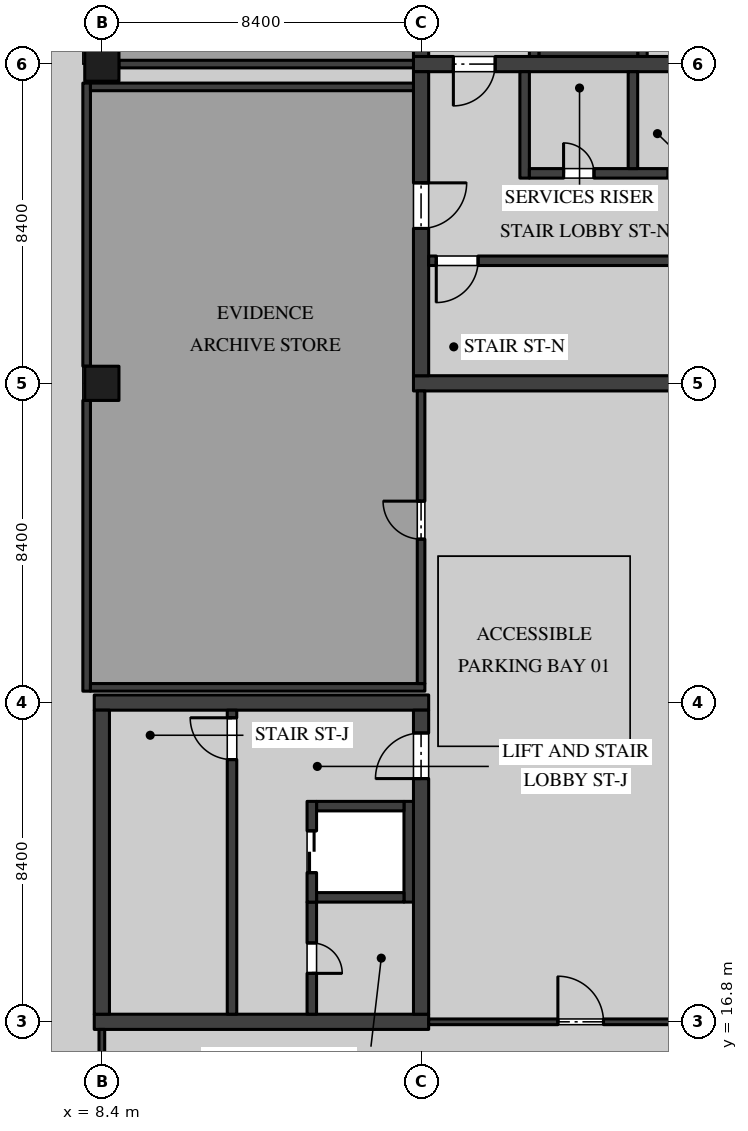
"""IFC4 building model, lengths in metres.
Left out: names, types, materials, properties, quantities, classifications, styles, units other than length and angle.
Written with IfcOpenShell. Run it as: python <this file> out.ifc"""

import sys

from ifc_helpers import new_model, si_unit, direction, frame, frame_2d, origin, origin_2d, place, context, subcontext, project, spatial, rectangle, extrude, element, fill, save


model = new_model("IFC4")
c1 = context("Model", 3, precision=1e-05, world=origin(), true_north=direction((0.0, 1.0)))
c2 = subcontext(c1, "Body", "Model", "MODEL_VIEW")
j1 = project(units=[si_unit("LENGTHUNIT", "METRE"), si_unit("PLANEANGLEUNIT", "RADIAN")], contexts=[c1])
p1 = place(None, origin())
s1 = spatial("IfcSite", under=j1, at=p1, CompositionType="ELEMENT")
p2 = place(p1, origin())
s2 = spatial("IfcBuilding", under=s1, at=p2, CompositionType="ELEMENT")
p3 = place(p2, frame((0.0, 0.0, -4.5)))
s3 = spatial("IfcBuildingStorey", under=s2, at=p3, CompositionType="ELEMENT", Elevation=-4.5)
for number, where, z_axis, x_axis in (
    (1, (8.4, 33.6, 0.0), (0.0, 0.0, 1.0), (1.0, 0.0, 0.0)),
    (2, (8.4, 42.0, 0.0), (0.0, 0.0, 1.0), (1.0, 0.0, 0.0)),
):
    element("IfcColumn", number, at=place(p3, frame(where, z_axis=z_axis, x_axis=x_axis)), inside=s3, PredefinedType="COLUMN", context=c2, shape_type="SweptSolid", body=[
        extrude(rectangle(XDim=0.9, YDim=0.9, at=origin_2d()), origin(), (0.0, 0.0, 1.0), 4.05),
    ])
for number, where, z_axis, x_axis in (
    (3, (8.2, 16.8, 0.0), (0.0, 0.0, 1.0), (1.0, 0.0, 0.0)),
    (4, (8.2, 25.2, 0.0), (0.0, 0.0, 1.0), (1.0, 0.0, 0.0)),
):
    element("IfcWall", number, at=place(p3, frame(where, z_axis=z_axis, x_axis=x_axis)), inside=s3, PredefinedType="SHEAR", context=c2, shape_type="SweptSolid", body=[
        extrude(rectangle(XDim=8.8, YDim=0.4, at=frame_2d((4.4, 0.0))), origin(), (0.0, 0.0, 1.0), 4.05),
    ])
p4 = place(p3, frame((8.4, 17.0, 0.0), z_axis=(0.0, 0.0, 1.0), x_axis=(0.0, 1.0, 0.0)))
e5 = element("IfcWall", 5, at=p4, inside=s3, PredefinedType="SHEAR", context=c2, shape_type="SweptSolid", body=[
    extrude(rectangle(XDim=8.0, YDim=0.4, at=frame_2d((4.0, 0.0))), origin(), (0.0, 0.0, 1.0), 4.05),
])
p5 = place(p3, frame((16.8, 17.0, 0.0), z_axis=(0.0, 0.0, 1.0), x_axis=(0.0, 1.0, 0.0)))
e6 = element("IfcWall", 6, at=p5, inside=s3, PredefinedType="SHEAR", context=c2, shape_type="SweptSolid", body=[
    extrude(rectangle(XDim=8.0, YDim=0.4, at=frame_2d((4.0, 0.0))), origin(), (0.0, 0.0, 1.0), 4.05),
])
p6 = place(p5, frame((6.2, 0.0, 0.0)))
e7 = element("IfcOpeningElement", 7, at=p6, cuts=e6, PredefinedType="OPENING", context=c2, shape_type="SweptSolid", body=[
    extrude(rectangle(XDim=1.2, YDim=2.1, at=frame_2d((0.6, 1.05))), frame((0.0, 0.21, 0.0), z_axis=(0.0, -1.0, 0.0), x_axis=(1.0, 0.0, 0.0)), (0.0, 0.0, 1.0), 0.42),
])
p7 = place(p3, frame((11.825, 25.0, 0.0), z_axis=(0.0, 0.0, 1.0), x_axis=(0.0, -1.0, 0.0)))
e8 = element("IfcWall", 8, at=p7, inside=s3, PredefinedType="SOLIDWALL", context=c2, shape_type="SweptSolid", body=[
    extrude(rectangle(XDim=8.0, YDim=0.25, at=frame_2d((4.0, 0.0))), origin(), (0.0, 0.0, 1.0), 4.05),
])
p8 = place(p7, frame((0.2, 0.0, 0.0)))
e9 = element("IfcOpeningElement", 9, at=p8, cuts=e8, PredefinedType="OPENING", context=c2, shape_type="SweptSolid", body=[
    extrude(rectangle(XDim=1.1, YDim=2.1, at=frame_2d((0.55, 1.05))), frame((0.0, 0.135, 0.0), z_axis=(0.0, -1.0, 0.0), x_axis=(1.0, 0.0, 0.0)), (0.0, 0.0, 1.0), 0.27),
])
p9 = place(p3, frame((13.925, 19.95, 0.0), z_axis=(0.0, 0.0, 1.0), x_axis=(0.0, -1.0, 0.0)))
e10 = element("IfcWall", 10, at=p9, inside=s3, PredefinedType="SOLIDWALL", context=c2, shape_type="SweptSolid", body=[
    extrude(rectangle(XDim=2.95, YDim=0.25, at=frame_2d((1.475, 0.0))), origin(), (0.0, 0.0, 1.0), 4.05),
])
p10 = place(p9, frame((1.075, 0.0, 0.0)))
e11 = element("IfcOpeningElement", 11, at=p10, cuts=e10, PredefinedType="OPENING", context=c2, shape_type="SweptSolid", body=[
    extrude(rectangle(XDim=0.8, YDim=2.1, at=frame_2d((0.4, 1.05))), frame((0.0, 0.135, 0.0), z_axis=(0.0, -1.0, 0.0), x_axis=(1.0, 0.0, 0.0)), (0.0, 0.0, 1.0), 0.27),
])
p11 = place(p3, frame((16.6, 42.0, 0.0), z_axis=(0.0, 0.0, 1.0), x_axis=(1.0, 0.0, 0.0)))
e12 = element("IfcWall", 12, at=p11, inside=s3, PredefinedType="SHEAR", context=c2, shape_type="SweptSolid", body=[
    extrude(rectangle(XDim=8.8, YDim=0.4, at=frame_2d((4.4, 0.0))), origin(), (0.0, 0.0, 1.0), 4.05),
])
p12 = place(p11, frame((1.05, 0.0, 0.0)))
e13 = element("IfcOpeningElement", 13, at=p12, cuts=e12, PredefinedType="OPENING", context=c2, shape_type="SweptSolid", body=[
    extrude(rectangle(XDim=1.1, YDim=2.1, at=frame_2d((0.55, 1.05))), frame((0.0, 0.21, 0.0), z_axis=(0.0, -1.0, 0.0), x_axis=(1.0, 0.0, 0.0)), (0.0, 0.0, 1.0), 0.42),
])
p13 = place(p3, frame((16.8, 42.2, 0.0), z_axis=(0.0, 0.0, 1.0), x_axis=(0.0, 1.0, 0.0)))
e14 = element("IfcWall", 14, at=p13, inside=s3, PredefinedType="SHEAR", context=c2, shape_type="SweptSolid", body=[
    extrude(rectangle(XDim=8.0, YDim=0.4, at=frame_2d((4.0, 0.0))), origin(), (0.0, 0.0, 1.0), 4.05),
])
p14 = place(p13, frame((3.55, 0.0, 0.0)))
e15 = element("IfcOpeningElement", 15, at=p14, cuts=e14, PredefinedType="OPENING", context=c2, shape_type="SweptSolid", body=[
    extrude(rectangle(XDim=1.2, YDim=2.1, at=frame_2d((0.6, 1.05))), frame((0.0, 0.21, 0.0), z_axis=(0.0, -1.0, 0.0), x_axis=(1.0, 0.0, 0.0)), (0.0, 0.0, 1.0), 0.42),
])
p15 = place(p13, frame((0.8, 0.0, 0.0)))
e16 = element("IfcOpeningElement", 16, at=p15, cuts=e14, PredefinedType="OPENING", context=c2, shape_type="SweptSolid", body=[
    extrude(rectangle(XDim=1.2, YDim=2.1, at=frame_2d((0.6, 1.05))), frame((0.0, 0.21, 0.0), z_axis=(0.0, -1.0, 0.0), x_axis=(1.0, 0.0, 0.0)), (0.0, 0.0, 1.0), 0.42),
])
p16 = place(p3, frame((16.6, 33.6, 0.0), z_axis=(0.0, 0.0, 1.0), x_axis=(1.0, 0.0, 0.0)))
e17 = element("IfcWall", 17, at=p16, inside=s3, PredefinedType="SHEAR", context=c2, shape_type="SweptSolid", body=[
    extrude(rectangle(XDim=8.8, YDim=0.4, at=frame_2d((4.4, 0.0))), origin(), (0.0, 0.0, 1.0), 4.05),
])
p17 = place(p3, frame((16.8, 33.8, 0.0), z_axis=(0.0, 0.0, 1.0), x_axis=(0.0, 1.0, 0.0)))
e18 = element("IfcWall", 18, at=p17, inside=s3, PredefinedType="SHEAR", context=c2, shape_type="SweptSolid", body=[
    extrude(rectangle(XDim=8.0, YDim=0.4, at=frame_2d((4.0, 0.0))), origin(), (0.0, 0.0, 1.0), 4.05),
])
p18 = place(p17, frame((3.875, 0.0, 0.0)))
e19 = element("IfcOpeningElement", 19, at=p18, cuts=e18, PredefinedType="OPENING", context=c2, shape_type="SweptSolid", body=[
    extrude(rectangle(XDim=1.2, YDim=2.1, at=frame_2d((0.6, 1.05))), frame((0.0, 0.21, 0.0), z_axis=(0.0, -1.0, 0.0), x_axis=(1.0, 0.0, 0.0)), (0.0, 0.0, 1.0), 0.42),
])
p19 = place(p3, frame((17.0, 36.825, 0.0), z_axis=(0.0, 0.0, 1.0), x_axis=(1.0, 0.0, 0.0)))
e20 = element("IfcWall", 20, at=p19, inside=s3, PredefinedType="SOLIDWALL", context=c2, shape_type="SweptSolid", body=[
    extrude(rectangle(XDim=8.0, YDim=0.25, at=frame_2d((4.0, 0.0))), origin(), (0.0, 0.0, 1.0), 4.05),
])
p20 = place(p19, frame((0.2, 0.0, 0.0)))
e21 = element("IfcOpeningElement", 21, at=p20, cuts=e20, PredefinedType="OPENING", context=c2, shape_type="SweptSolid", body=[
    extrude(rectangle(XDim=1.1, YDim=2.1, at=frame_2d((0.55, 1.05))), frame((0.0, 0.135, 0.0), z_axis=(0.0, -1.0, 0.0), x_axis=(1.0, 0.0, 0.0)), (0.0, 0.0, 1.0), 0.27),
])
p21 = place(p3, frame((19.525, 39.0, 0.0), z_axis=(0.0, 0.0, 1.0), x_axis=(0.0, 1.0, 0.0)))
e22 = element("IfcWall", 22, at=p21, inside=s3, PredefinedType="SOLIDWALL", context=c2, shape_type="SweptSolid", body=[
    extrude(rectangle(XDim=2.8, YDim=0.25, at=frame_2d((1.4, 0.0))), origin(), (0.0, 0.0, 1.0), 4.05),
])
p22 = place(p3, frame((19.65, 39.125, 0.0), z_axis=(0.0, 0.0, 1.0), x_axis=(1.0, 0.0, 0.0)))
e23 = element("IfcWall", 23, at=p22, inside=s3, PredefinedType="SOLIDWALL", context=c2, shape_type="SweptSolid", body=[
    extrude(rectangle(XDim=5.35, YDim=0.25, at=frame_2d((2.675, 0.0))), origin(), (0.0, 0.0, 1.0), 4.05),
])
p23 = place(p22, frame((3.65, 0.0, 0.0)))
e24 = element("IfcOpeningElement", 24, at=p23, cuts=e23, PredefinedType="OPENING", context=c2, shape_type="SweptSolid", body=[
    extrude(rectangle(XDim=0.9, YDim=2.1, at=frame_2d((0.45, 1.05))), frame((0.0, 0.135, 0.0), z_axis=(0.0, -1.0, 0.0), x_axis=(1.0, 0.0, 0.0)), (0.0, 0.0, 1.0), 0.27),
])
p24 = place(p22, frame((0.9, 0.0, 0.0)))
e25 = element("IfcOpeningElement", 25, at=p24, cuts=e23, PredefinedType="OPENING", context=c2, shape_type="SweptSolid", body=[
    extrude(rectangle(XDim=0.8, YDim=2.1, at=frame_2d((0.4, 1.05))), frame((0.0, 0.135, 0.0), z_axis=(0.0, -1.0, 0.0), x_axis=(1.0, 0.0, 0.0)), (0.0, 0.0, 1.0), 0.27),
])
p25 = place(p3, frame((22.375, 39.25, 0.0), z_axis=(0.0, 0.0, 1.0), x_axis=(0.0, 1.0, 0.0)))
e26 = element("IfcWall", 26, at=p25, inside=s3, PredefinedType="SOLIDWALL", context=c2, shape_type="SweptSolid", body=[
    extrude(rectangle(XDim=2.55, YDim=0.25, at=frame_2d((1.275, 0.0))), origin(), (0.0, 0.0, 1.0), 4.05),
])
p26 = place(p3, frame((22.625, 42.2, 0.0), z_axis=(0.0, 0.0, 1.0), x_axis=(0.0, 1.0, 0.0)))
e27 = element("IfcWall", 27, at=p26, inside=s3, PredefinedType="SOLIDWALL", context=c2, shape_type="SweptSolid", body=[
    extrude(rectangle(XDim=3.1, YDim=0.25, at=frame_2d((1.55, 0.0))), origin(), (0.0, 0.0, 1.0), 4.05),
])
p27 = place(p3, frame((19.9, 42.325, 0.0), z_axis=(0.0, 0.0, 1.0), x_axis=(1.0, 0.0, 0.0)))
e28 = element("IfcWall", 28, at=p27, inside=s3, PredefinedType="SOLIDWALL", context=c2, shape_type="SweptSolid", body=[
    extrude(rectangle(XDim=2.6, YDim=0.25, at=frame_2d((1.3, 0.0))), origin(), (0.0, 0.0, 1.0), 4.05),
])
p28 = place(p3, frame((19.775, 42.2, 0.0), z_axis=(0.0, 0.0, 1.0), x_axis=(0.0, 1.0, 0.0)))
e29 = element("IfcWall", 29, at=p28, inside=s3, PredefinedType="SOLIDWALL", context=c2, shape_type="SweptSolid", body=[
    extrude(rectangle(XDim=3.1, YDim=0.25, at=frame_2d((1.55, 0.0))), origin(), (0.0, 0.0, 1.0), 4.05),
])
p29 = place(p28, frame((1.0, 0.0, 0.0)))
e30 = element("IfcOpeningElement", 30, at=p29, cuts=e29, PredefinedType="OPENING", context=c2, shape_type="SweptSolid", body=[
    extrude(rectangle(XDim=1.1, YDim=2.1, at=frame_2d((0.55, 1.05))), frame((0.0, 0.135, 0.0), z_axis=(0.0, -1.0, 0.0), x_axis=(1.0, 0.0, 0.0)), (0.0, 0.0, 1.0), 0.27),
])
p30 = place(p3, frame((16.475, 19.95, 0.0), z_axis=(0.0, 0.0, 1.0), x_axis=(0.0, 1.0, 0.0)))
e31 = element("IfcWall", 31, at=p30, inside=s3, PredefinedType="SOLIDWALL", context=c2, shape_type="SweptSolid", body=[
    extrude(rectangle(XDim=2.65, YDim=0.25, at=frame_2d((1.325, 0.0))), origin(), (0.0, 0.0, 1.0), 4.05),
])
for number, where, z_axis, x_axis in (
    (32, (14.05, 22.475, 0.0), (0.0, 0.0, 1.0), (1.0, 0.0, 0.0)),
    (33, (14.05, 20.075, 0.0), (0.0, 0.0, 1.0), (1.0, 0.0, 0.0)),
):
    element("IfcWall", number, at=place(p3, frame(where, z_axis=z_axis, x_axis=x_axis)), inside=s3, PredefinedType="SOLIDWALL", context=c2, shape_type="SweptSolid", body=[
        extrude(rectangle(XDim=2.3, YDim=0.25, at=frame_2d((1.15, 0.0))), origin(), (0.0, 0.0, 1.0), 4.05),
    ])
p31 = place(p3, frame((13.925, 19.95, 0.0), z_axis=(0.0, 0.0, 1.0), x_axis=(0.0, 1.0, 0.0)))
e34 = element("IfcWall", 34, at=p31, inside=s3, PredefinedType="SOLIDWALL", context=c2, shape_type="SweptSolid", body=[
    extrude(rectangle(XDim=2.65, YDim=0.25, at=frame_2d((1.325, 0.0))), origin(), (0.0, 0.0, 1.0), 4.05),
])
p32 = place(p31, frame((0.775, 0.0, 0.0)))
e35 = element("IfcOpeningElement", 35, at=p32, cuts=e34, PredefinedType="OPENING", context=c2, shape_type="SweptSolid", body=[
    extrude(rectangle(XDim=1.1, YDim=2.1, at=frame_2d((0.55, 1.05))), frame((0.0, 0.135, 0.0), z_axis=(0.0, -1.0, 0.0), x_axis=(1.0, 0.0, 0.0)), (0.0, 0.0, 1.0), 0.27),
])
p33 = place(p3, frame((8.4, 8.8, 0.0), z_axis=(0.0, 0.0, 1.0), x_axis=(0.0, 1.0, 0.0)))
e36 = element("IfcWall", 36, at=p33, inside=s3, PredefinedType="PARTITIONING", context=c2, shape_type="SweptSolid", body=[
    extrude(rectangle(XDim=7.8, YDim=0.15, at=frame_2d((3.9, 0.0))), origin(), (0.0, 0.0, 1.0), 4.05),
])
p34 = place(p3, frame((17.0, 16.8, 0.0), z_axis=(0.0, 0.0, 1.0), x_axis=(1.0, 0.0, 0.0)))
e37 = element("IfcWall", 37, at=p34, inside=s3, PredefinedType="PARTITIONING", context=c2, shape_type="SweptSolid", body=[
    extrude(rectangle(XDim=7.8, YDim=0.15, at=frame_2d((3.9, 0.0))), origin(), (0.0, 0.0, 1.0), 4.05),
])
p35 = place(p34, frame((3.4, 0.0, 0.0)))
e38 = element("IfcOpeningElement", 38, at=p35, cuts=e37, PredefinedType="OPENING", context=c2, shape_type="SweptSolid", body=[
    extrude(rectangle(XDim=1.2, YDim=2.1, at=frame_2d((0.6, 1.05))), frame((0.0, 0.085, 0.0), z_axis=(0.0, -1.0, 0.0), x_axis=(1.0, 0.0, 0.0)), (0.0, 0.0, 1.0), 0.17),
])
p36 = place(p3, frame((8.85, 42.0, 0.0), z_axis=(0.0, 0.0, 1.0), x_axis=(1.0, 0.0, 0.0)))
e39 = element("IfcWall", 39, at=p36, inside=s3, PredefinedType="PARTITIONING", context=c2, shape_type="SweptSolid", body=[
    extrude(rectangle(XDim=7.75, YDim=0.2, at=frame_2d((3.875, 0.0))), origin(), (0.0, 0.0, 1.0), 4.05),
])
p37 = place(p3, frame((8.0, 25.5, 0.0), z_axis=(0.0, 0.0, 1.0), x_axis=(0.0, 1.0, 0.0)))
e40 = element("IfcWall", 40, at=p37, inside=s3, PredefinedType="PARTITIONING", context=c2, shape_type="SweptSolid", body=[
    extrude(rectangle(XDim=7.65, YDim=0.2, at=frame_2d((3.825, 0.0))), origin(), (0.0, 0.0, 1.0), 4.05),
])
p38 = place(p3, frame((8.0, 34.05, 0.0), z_axis=(0.0, 0.0, 1.0), x_axis=(0.0, 1.0, 0.0)))
e41 = element("IfcWall", 41, at=p38, inside=s3, PredefinedType="PARTITIONING", context=c2, shape_type="SweptSolid", body=[
    extrude(rectangle(XDim=7.45, YDim=0.2, at=frame_2d((3.725, 0.0))), origin(), (0.0, 0.0, 1.0), 4.05),
])
p39 = place(p3, frame((8.1, 25.6, 0.0), z_axis=(0.0, 0.0, 1.0), x_axis=(1.0, 0.0, 0.0)))
e42 = element("IfcWall", 42, at=p39, inside=s3, PredefinedType="PARTITIONING", context=c2, shape_type="SweptSolid", body=[
    extrude(rectangle(XDim=8.8, YDim=0.2, at=frame_2d((4.4, 0.0))), origin(), (0.0, 0.0, 1.0), 4.05),
])
p40 = place(p3, frame((8.1, 41.4, 0.0), z_axis=(0.0, 0.0, 1.0), x_axis=(1.0, 0.0, 0.0)))
e43 = element("IfcWall", 43, at=p40, inside=s3, PredefinedType="PARTITIONING", context=c2, shape_type="SweptSolid", body=[
    extrude(rectangle(XDim=8.5, YDim=0.2, at=frame_2d((4.25, 0.0))), origin(), (0.0, 0.0, 1.0), 4.05),
])
p41 = place(p3, frame((16.8, 25.7, 0.0), z_axis=(0.0, 0.0, 1.0), x_axis=(0.0, 1.0, 0.0)))
e44 = element("IfcWall", 44, at=p41, inside=s3, PredefinedType="PARTITIONING", context=c2, shape_type="SweptSolid", body=[
    extrude(rectangle(XDim=7.7, YDim=0.2, at=frame_2d((3.85, 0.0))), origin(), (0.0, 0.0, 1.0), 4.05),
])
p42 = place(p41, frame((3.8, 0.0, 0.0)))
e45 = element("IfcOpeningElement", 45, at=p42, cuts=e44, PredefinedType="OPENING", context=c2, shape_type="SweptSolid", body=[
    extrude(rectangle(XDim=1.0, YDim=2.1, at=frame_2d((0.5, 1.05))), frame((0.0, 0.11, 0.0), z_axis=(0.0, -1.0, 0.0), x_axis=(1.0, 0.0, 0.0)), (0.0, 0.0, 1.0), 0.22),
])
p43 = place(p6, origin())
e46 = element("IfcDoor", 46, at=p43, inside=s3, OperationType="SINGLE_SWING_RIGHT", PredefinedType="DOOR", context=c2, shape_type="SweptSolid", body=[
    extrude(rectangle(XDim=1.2, YDim=2.1, at=frame_2d((0.6, 1.05))), frame((0.0, 0.035, 0.0), z_axis=(0.0, -1.0, 0.0), x_axis=(1.0, 0.0, 0.0)), (0.0, 0.0, 1.0), 0.07),
])
fill(e7, e46)
p44 = place(p10, origin())
e47 = element("IfcDoor", 47, at=p44, inside=s3, OperationType="SINGLE_SWING_LEFT", PredefinedType="DOOR", context=c2, shape_type="SweptSolid", body=[
    extrude(rectangle(XDim=0.8, YDim=2.1, at=frame_2d((0.4, 1.05))), frame((0.0, 0.035, 0.0), z_axis=(0.0, -1.0, 0.0), x_axis=(1.0, 0.0, 0.0)), (0.0, 0.0, 1.0), 0.07),
])
fill(e11, e47)
p45 = place(p8, frame((1.1, 0.0, 0.0), z_axis=(0.0, 0.0, 1.0), x_axis=(-1.0, 0.0, 0.0)))
e48 = element("IfcDoor", 48, at=p45, inside=s3, OperationType="SINGLE_SWING_LEFT", PredefinedType="DOOR", context=c2, shape_type="SweptSolid", body=[
    extrude(rectangle(XDim=1.1, YDim=2.1, at=frame_2d((0.55, 1.05))), frame((0.0, 0.035, 0.0), z_axis=(0.0, -1.0, 0.0), x_axis=(1.0, 0.0, 0.0)), (0.0, 0.0, 1.0), 0.07),
])
fill(e9, e48)
p46 = place(p12, frame((1.1, 0.0, 0.0), z_axis=(0.0, 0.0, 1.0), x_axis=(-1.0, 0.0, 0.0)))
e49 = element("IfcDoor", 49, at=p46, inside=s3, OperationType="SINGLE_SWING_LEFT", PredefinedType="DOOR", context=c2, shape_type="SweptSolid", body=[
    extrude(rectangle(XDim=1.1, YDim=2.1, at=frame_2d((0.55, 1.05))), frame((0.0, 0.035, 0.0), z_axis=(0.0, -1.0, 0.0), x_axis=(1.0, 0.0, 0.0)), (0.0, 0.0, 1.0), 0.07),
])
fill(e13, e49)
p47 = place(p23, origin())
e50 = element("IfcDoor", 50, at=p47, inside=s3, OperationType="SINGLE_SWING_LEFT", PredefinedType="DOOR", context=c2, shape_type="SweptSolid", body=[
    extrude(rectangle(XDim=0.9, YDim=2.1, at=frame_2d((0.45, 1.05))), frame((0.0, 0.035, 0.0), z_axis=(0.0, -1.0, 0.0), x_axis=(1.0, 0.0, 0.0)), (0.0, 0.0, 1.0), 0.07),
])
fill(e24, e50)
p48 = place(p18, frame((1.2, 0.0, 0.0), z_axis=(0.0, 0.0, 1.0), x_axis=(-1.0, 0.0, 0.0)))
e51 = element("IfcDoor", 51, at=p48, inside=s3, OperationType="SINGLE_SWING_RIGHT", PredefinedType="DOOR", context=c2, shape_type="SweptSolid", body=[
    extrude(rectangle(XDim=1.2, YDim=2.1, at=frame_2d((0.6, 1.05))), frame((0.0, 0.035, 0.0), z_axis=(0.0, -1.0, 0.0), x_axis=(1.0, 0.0, 0.0)), (0.0, 0.0, 1.0), 0.07),
])
fill(e19, e51)
p49 = place(p24, origin())
e52 = element("IfcDoor", 52, at=p49, inside=s3, OperationType="SINGLE_SWING_RIGHT", PredefinedType="DOOR", context=c2, shape_type="SweptSolid", body=[
    extrude(rectangle(XDim=0.8, YDim=2.1, at=frame_2d((0.4, 1.05))), frame((0.0, 0.035, 0.0), z_axis=(0.0, -1.0, 0.0), x_axis=(1.0, 0.0, 0.0)), (0.0, 0.0, 1.0), 0.07),
])
fill(e25, e52)
p50 = place(p20, frame((1.1, 0.0, 0.0), z_axis=(0.0, 0.0, 1.0), x_axis=(-1.0, 0.0, 0.0)))
e53 = element("IfcDoor", 53, at=p50, inside=s3, OperationType="SINGLE_SWING_LEFT", PredefinedType="DOOR", context=c2, shape_type="SweptSolid", body=[
    extrude(rectangle(XDim=1.1, YDim=2.1, at=frame_2d((0.55, 1.05))), frame((0.0, 0.035, 0.0), z_axis=(0.0, -1.0, 0.0), x_axis=(1.0, 0.0, 0.0)), (0.0, 0.0, 1.0), 0.07),
])
fill(e21, e53)
p51 = place(p32, origin())
e54 = element("IfcDoor", 54, at=p51, inside=s3, OperationType="DOUBLE_DOOR_SLIDING", PredefinedType="DOOR", context=c2, shape_type="SweptSolid", body=[
    extrude(rectangle(XDim=1.1, YDim=2.1, at=frame_2d((0.55, 1.05))), frame((0.0, 0.04, 0.0), z_axis=(0.0, -1.0, 0.0), x_axis=(1.0, 0.0, 0.0)), (0.0, 0.0, 1.0), 0.08),
])
fill(e35, e54)
p52 = place(p35, origin())
e55 = element("IfcDoor", 55, at=p52, inside=s3, OperationType="SINGLE_SWING_RIGHT", PredefinedType="DOOR", context=c2, shape_type="SweptSolid", body=[
    extrude(rectangle(XDim=1.2, YDim=2.1, at=frame_2d((0.6, 1.05))), frame((0.0, 0.03, 0.0), z_axis=(0.0, -1.0, 0.0), x_axis=(1.0, 0.0, 0.0)), (0.0, 0.0, 1.0), 0.06),
])
fill(e38, e55)
p53 = place(p42, origin())
e56 = element("IfcDoor", 56, at=p53, inside=s3, OperationType="SINGLE_SWING_LEFT", PredefinedType="DOOR", context=c2, shape_type="SweptSolid", body=[
    extrude(rectangle(XDim=1.0, YDim=2.1, at=frame_2d((0.5, 1.05))), frame((0.0, 0.045, 0.0), z_axis=(0.0, -1.0, 0.0), x_axis=(1.0, 0.0, 0.0)), (0.0, 0.0, 1.0), 0.09),
])
fill(e45, e56)
save(model, sys.argv[1])
